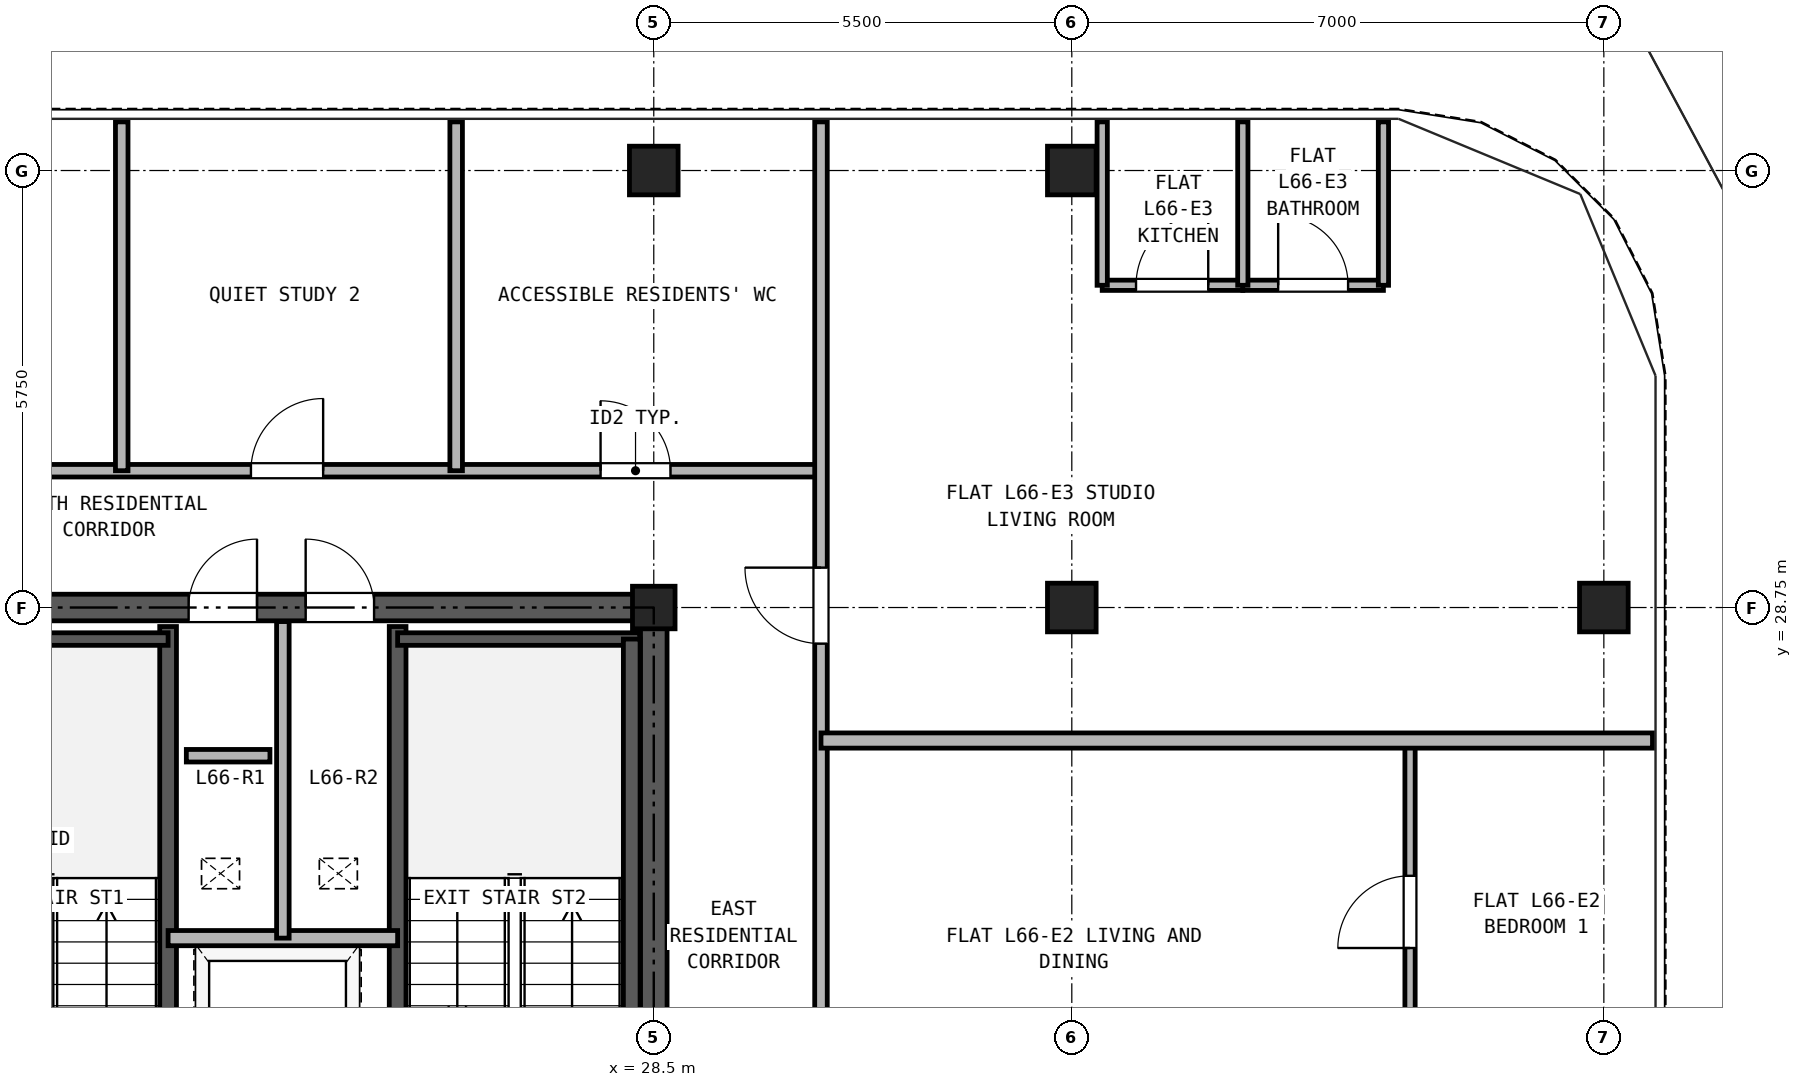
"""IFC4 building model, lengths in metres.
Left out: names, types, materials, properties, quantities, classifications, styles, units other than length and angle.
Written with IfcOpenShell. Run it as: python <this file> out.ifc"""

import sys

from ifc_helpers import new_model, si_unit, direction, frame, frame_2d, origin, origin_2d, place, context, subcontext, project, spatial, rectangle, hollow_rectangle, extrude, source, transform, mapped, element, fill, save


model = new_model("IFC4")
c1 = context("Model", 3, precision=1e-05, world=origin(), true_north=direction((0.0, 1.0)))
c2 = subcontext(c1, "Body", "Model", "MODEL_VIEW")
j1 = project(units=[si_unit("LENGTHUNIT", "METRE"), si_unit("PLANEANGLEUNIT", "RADIAN")], contexts=[c1])
p1 = place(None, origin())
s1 = spatial("IfcSite", under=j1, at=p1, CompositionType="ELEMENT")
p2 = place(p1, origin())
s2 = spatial("IfcBuilding", under=s1, at=p2, CompositionType="ELEMENT")
p3 = place(p2, frame((0.0, 0.0, 232.9)))
s3 = spatial("IfcBuildingStorey", under=s2, at=p3, CompositionType="ELEMENT", Elevation=232.9)
m1 = source(origin(), c2, "Body", "SweptSolid", [
    extrude(hollow_rectangle(XDim=0.64, YDim=0.64, WallThickness=0.035, at=origin_2d()), origin(), (0.0, 0.0, 1.0), 2.98),
])
for number, where, z_axis, x_axis in (
    (1, (28.5, 34.5, 0.0), (0.0, 0.0, 1.0), (1.0, 0.0, 0.0)),
    (2, (34.0, 34.5, 0.0), (0.0, 0.0, 1.0), (1.0, 0.0, 0.0)),
    (3, (41.0, 28.75, 0.0), (0.0, 0.0, 1.0), (1.0, 0.0, 0.0)),
):
    element("IfcColumn", number, at=place(p3, frame(where, z_axis=z_axis, x_axis=x_axis)), inside=s3, PredefinedType="COLUMN", context=c2, shape_type="MappedRepresentation", body=[
        mapped(m1, transform((0.0, 0.0, 0.0), x_axis=(1.0, 0.0, 0.0), y_axis=(0.0, 1.0, 0.0), z_axis=(0.0, 0.0, 1.0), scale=1.0)),
    ])
m2 = source(origin(), c2, "Body", "SweptSolid", [
    extrude(hollow_rectangle(XDim=0.56, YDim=0.56, WallThickness=0.03, at=origin_2d()), origin(), (0.0, 0.0, 1.0), 2.98),
])
p4 = place(p3, frame((28.5, 28.75, 0.0), z_axis=(0.0, 0.0, 1.0), x_axis=(1.0, 0.0, 0.0)))
e4 = element("IfcColumn", 4, at=p4, inside=s3, PredefinedType="COLUMN", context=c2, shape_type="MappedRepresentation", body=[
    mapped(m2, transform((0.0, 0.0, 0.0), x_axis=(1.0, 0.0, 0.0), y_axis=(0.0, 1.0, 0.0), z_axis=(0.0, 0.0, 1.0), scale=1.0)),
])
p5 = place(p3, frame((34.0, 28.75, 0.0), z_axis=(0.0, 0.0, 1.0), x_axis=(1.0, 0.0, 0.0)))
e5 = element("IfcColumn", 5, at=p5, inside=s3, PredefinedType="COLUMN", context=c2, shape_type="MappedRepresentation", body=[
    mapped(m1, transform((0.0, 0.0, 0.0), x_axis=(1.0, 0.0, 0.0), y_axis=(0.0, 1.0, 0.0), z_axis=(0.0, 0.0, 1.0), scale=1.0)),
])
p6 = place(p3, frame((18.325, 28.75, 0.0), z_axis=(0.0, 0.0, 1.0), x_axis=(1.0, 0.0, 0.0)))
e6 = element("IfcWall", 6, at=p6, inside=s3, PredefinedType="SHEAR", context=c2, shape_type="SweptSolid", body=[
    extrude(rectangle(XDim=10.35, YDim=0.35, at=frame_2d((5.175, 0.0))), origin(), (0.0, 0.0, 1.0), 2.98),
])
p7 = place(p6, frame((4.055, 0.0, 0.0)))
e7 = element("IfcOpeningElement", 7, at=p7, cuts=e6, PredefinedType="OPENING", context=c2, shape_type="SweptSolid", body=[
    extrude(rectangle(XDim=0.9, YDim=2.05, at=frame_2d((0.45, 1.025))), frame((0.0, 0.185, 0.0), z_axis=(0.0, -1.0, 0.0), x_axis=(1.0, 0.0, 0.0)), (0.0, 0.0, 1.0), 0.37),
])
p8 = place(p6, frame((5.595, 0.0, 0.0)))
e8 = element("IfcOpeningElement", 8, at=p8, cuts=e6, PredefinedType="OPENING", context=c2, shape_type="SweptSolid", body=[
    extrude(rectangle(XDim=0.9, YDim=2.05, at=frame_2d((0.45, 1.025))), frame((0.0, 0.185, 0.0), z_axis=(0.0, -1.0, 0.0), x_axis=(1.0, 0.0, 0.0)), (0.0, 0.0, 1.0), 0.37),
])
p9 = place(p3, frame((28.5, 11.675, 0.0), z_axis=(0.0, 0.0, 1.0), x_axis=(0.0, 1.0, 0.0)))
e9 = element("IfcWall", 9, at=p9, inside=s3, PredefinedType="SHEAR", context=c2, shape_type="SweptSolid", body=[
    extrude(rectangle(XDim=16.9, YDim=0.35, at=frame_2d((8.45, 0.0))), origin(), (0.0, 0.0, 1.0), 2.98),
])
p10 = place(p9, frame((7.475, 0.0, 0.0)))
e10 = element("IfcOpeningElement", 10, at=p10, cuts=e9, PredefinedType="OPENING", context=c2, shape_type="SweptSolid", body=[
    extrude(rectangle(XDim=1.15, YDim=2.2, at=frame_2d((0.575, 1.1))), frame((0.0, 0.185, 0.0), z_axis=(0.0, -1.0, 0.0), x_axis=(1.0, 0.0, 0.0)), (0.0, 0.0, 1.0), 0.37),
])
for number, where, z_axis, x_axis in (
    (11, (22.11, 21.39, 0.0), (0.0, 0.0, 1.0), (0.0, 1.0, 0.0)),
    (12, (25.13, 21.39, 0.0), (0.0, 0.0, 1.0), (0.0, 1.0, 0.0)),
):
    element("IfcWall", number, at=place(p3, frame(where, z_axis=z_axis, x_axis=x_axis)), inside=s3, PredefinedType="SOLIDWALL", context=c2, shape_type="SweptSolid", body=[
        extrude(rectangle(XDim=7.11, YDim=0.22, at=frame_2d((3.555, 0.0))), origin(), (0.0, 0.0, 1.0), 2.98),
    ])
p11 = place(p3, frame((18.685, 28.335, 0.0), z_axis=(0.0, 0.0, 1.0), x_axis=(1.0, 0.0, 0.0)))
e13 = element("IfcWall", 13, at=p11, inside=s3, PredefinedType="PARTITIONING", context=c2, shape_type="SweptSolid", body=[
    extrude(rectangle(XDim=3.425, YDim=0.165, at=frame_2d((1.712, 0.0))), origin(), (0.0, 0.0, 1.0), 2.98),
])
p12 = place(p3, frame((25.13, 28.335, 0.0), z_axis=(0.0, 0.0, 1.0), x_axis=(1.0, 0.0, 0.0)))
e14 = element("IfcWall", 14, at=p12, inside=s3, PredefinedType="PARTITIONING", context=c2, shape_type="SweptSolid", body=[
    extrude(rectangle(XDim=3.185, YDim=0.165, at=frame_2d((1.593, 0.0))), origin(), (0.0, 0.0, 1.0), 2.98),
])
p13 = place(p3, frame((28.21, 21.39, 0.0), z_axis=(0.0, 0.0, 1.0), x_axis=(0.0, 1.0, 0.0)))
e15 = element("IfcWall", 15, at=p13, inside=s3, PredefinedType="SOLIDWALL", context=c2, shape_type="SweptSolid", body=[
    extrude(rectangle(XDim=6.945, YDim=0.22, at=frame_2d((3.473, 0.0))), origin(), (0.0, 0.0, 1.0), 2.98),
])
p14 = place(p3, frame((22.11, 24.4, 0.0), z_axis=(0.0, 0.0, 1.0), x_axis=(1.0, 0.0, 0.0)))
e16 = element("IfcWall", 16, at=p14, inside=s3, PredefinedType="PARTITIONING", context=c2, shape_type="SweptSolid", body=[
    extrude(rectangle(XDim=3.02, YDim=0.2, at=frame_2d((1.51, 0.0))), origin(), (0.0, 0.0, 1.0), 2.98),
])
p15 = place(p3, frame((23.62, 24.4, 0.0), z_axis=(0.0, 0.0, 1.0), x_axis=(0.0, 1.0, 0.0)))
e17 = element("IfcWall", 17, at=p15, inside=s3, PredefinedType="PARTITIONING", context=c2, shape_type="SweptSolid", body=[
    extrude(rectangle(XDim=4.165, YDim=0.165, at=frame_2d((2.083, 0.0))), origin(), (0.0, 0.0, 1.0), 2.98),
])
p16 = place(p3, frame((16.3, 30.55, 0.0), z_axis=(0.0, 0.0, 1.0), x_axis=(1.0, 0.0, 0.0)))
e18 = element("IfcWall", 18, at=p16, inside=s3, PredefinedType="PARTITIONING", context=c2, shape_type="SweptSolid", body=[
    extrude(rectangle(XDim=14.4, YDim=0.165, at=frame_2d((7.2, 0.0))), origin(), (0.0, 0.0, 1.0), 2.98),
])
p17 = place(p16, frame((2.1, 0.0, 0.0)))
e19 = element("IfcOpeningElement", 19, at=p17, cuts=e18, PredefinedType="OPENING", context=c2, shape_type="SweptSolid", body=[
    extrude(rectangle(XDim=0.95, YDim=2.15, at=frame_2d((0.475, 1.075))), frame((0.0, 0.093, 0.0), z_axis=(0.0, -1.0, 0.0), x_axis=(1.0, 0.0, 0.0)), (0.0, 0.0, 1.0), 0.185),
])
p18 = place(p16, frame((6.9, 0.0, 0.0)))
e20 = element("IfcOpeningElement", 20, at=p18, cuts=e18, PredefinedType="OPENING", context=c2, shape_type="SweptSolid", body=[
    extrude(rectangle(XDim=0.95, YDim=2.15, at=frame_2d((0.475, 1.075))), frame((0.0, 0.093, 0.0), z_axis=(0.0, -1.0, 0.0), x_axis=(1.0, 0.0, 0.0)), (0.0, 0.0, 1.0), 0.185),
])
p19 = place(p16, frame((11.5, 0.0, 0.0)))
e21 = element("IfcOpeningElement", 21, at=p19, cuts=e18, PredefinedType="OPENING", context=c2, shape_type="SweptSolid", body=[
    extrude(rectangle(XDim=0.92, YDim=2.1, at=frame_2d((0.46, 1.05))), frame((0.0, 0.093, 0.0), z_axis=(0.0, -1.0, 0.0), x_axis=(1.0, 0.0, 0.0)), (0.0, 0.0, 1.0), 0.185),
])
p20 = place(p3, frame((30.7, 11.45, 0.0), z_axis=(0.0, 0.0, 1.0), x_axis=(0.0, 1.0, 0.0)))
e22 = element("IfcWall", 22, at=p20, inside=s3, PredefinedType="PARTITIONING", context=c2, shape_type="SweptSolid", body=[
    extrude(rectangle(XDim=23.69, YDim=0.165, at=frame_2d((11.845, 0.0))), origin(), (0.0, 0.0, 1.0), 2.98),
])
p21 = place(p20, frame((3.025, 0.0, 0.0)))
e23 = element("IfcOpeningElement", 23, at=p21, cuts=e22, PredefinedType="OPENING", context=c2, shape_type="SweptSolid", body=[
    extrude(rectangle(XDim=1.0, YDim=2.15, at=frame_2d((0.5, 1.075))), frame((0.0, 0.093, 0.0), z_axis=(0.0, -1.0, 0.0), x_axis=(1.0, 0.0, 0.0)), (0.0, 0.0, 1.0), 0.185),
])
p22 = place(p20, frame((10.8, 0.0, 0.0)))
e24 = element("IfcOpeningElement", 24, at=p22, cuts=e22, PredefinedType="OPENING", context=c2, shape_type="SweptSolid", body=[
    extrude(rectangle(XDim=1.0, YDim=2.15, at=frame_2d((0.5, 1.075))), frame((0.0, 0.093, 0.0), z_axis=(0.0, -1.0, 0.0), x_axis=(1.0, 0.0, 0.0)), (0.0, 0.0, 1.0), 0.185),
])
p23 = place(p20, frame((16.825, 0.0, 0.0)))
e25 = element("IfcOpeningElement", 25, at=p23, cuts=e22, PredefinedType="OPENING", context=c2, shape_type="SweptSolid", body=[
    extrude(rectangle(XDim=1.0, YDim=2.15, at=frame_2d((0.5, 1.075))), frame((0.0, 0.093, 0.0), z_axis=(0.0, -1.0, 0.0), x_axis=(1.0, 0.0, 0.0)), (0.0, 0.0, 1.0), 0.185),
])
p24 = place(p3, frame((38.45, 22.5, 0.0), z_axis=(0.0, 0.0, 1.0), x_axis=(0.0, 1.0, 0.0)))
e26 = element("IfcWall", 26, at=p24, inside=s3, PredefinedType="PARTITIONING", context=c2, shape_type="SweptSolid", body=[
    extrude(rectangle(XDim=4.5, YDim=0.135, at=frame_2d((2.25, 0.0))), origin(), (0.0, 0.0, 1.0), 2.98),
])
p25 = place(p24, frame((1.77, 0.0, 0.0)))
e27 = element("IfcOpeningElement", 27, at=p25, cuts=e26, PredefinedType="OPENING", context=c2, shape_type="SweptSolid", body=[
    extrude(rectangle(XDim=0.95, YDim=2.15, at=frame_2d((0.475, 1.075))), frame((0.0, 0.077, 0.0), z_axis=(0.0, -1.0, 0.0), x_axis=(1.0, 0.0, 0.0)), (0.0, 0.0, 1.0), 0.155),
])
p26 = place(p3, frame((30.7, 27.0, 0.0), z_axis=(0.0, 0.0, 1.0), x_axis=(1.0, 0.0, 0.0)))
e28 = element("IfcWall", 28, at=p26, inside=s3, PredefinedType="PARTITIONING", context=c2, shape_type="SweptSolid", body=[
    extrude(rectangle(XDim=10.94, YDim=0.2, at=frame_2d((5.47, 0.0))), origin(), (0.0, 0.0, 1.0), 2.98),
])
p27 = place(p3, frame((34.4, 32.99, 0.0), z_axis=(0.0, 0.0, 1.0), x_axis=(1.0, 0.0, 0.0)))
e29 = element("IfcWall", 29, at=p27, inside=s3, PredefinedType="PARTITIONING", context=c2, shape_type="SweptSolid", body=[
    extrude(rectangle(XDim=1.85, YDim=0.135, at=frame_2d((0.925, 0.0))), origin(), (0.0, 0.0, 1.0), 2.98),
])
p28 = place(p27, frame((0.445, 0.0, 0.0)))
e30 = element("IfcOpeningElement", 30, at=p28, cuts=e29, PredefinedType="OPENING", context=c2, shape_type="SweptSolid", body=[
    extrude(rectangle(XDim=0.95, YDim=2.15, at=frame_2d((0.475, 1.075))), frame((0.0, 0.077, 0.0), z_axis=(0.0, -1.0, 0.0), x_axis=(1.0, 0.0, 0.0)), (0.0, 0.0, 1.0), 0.155),
])
p29 = place(p3, frame((36.25, 32.99, 0.0), z_axis=(0.0, 0.0, 1.0), x_axis=(1.0, 0.0, 0.0)))
e31 = element("IfcWall", 31, at=p29, inside=s3, PredefinedType="PARTITIONING", context=c2, shape_type="SweptSolid", body=[
    extrude(rectangle(XDim=1.85, YDim=0.135, at=frame_2d((0.925, 0.0))), origin(), (0.0, 0.0, 1.0), 2.98),
])
p30 = place(p29, frame((0.465, 0.0, 0.0)))
e32 = element("IfcOpeningElement", 32, at=p30, cuts=e31, PredefinedType="OPENING", context=c2, shape_type="SweptSolid", body=[
    extrude(rectangle(XDim=0.92, YDim=2.1, at=frame_2d((0.46, 1.05))), frame((0.0, 0.077, 0.0), z_axis=(0.0, -1.0, 0.0), x_axis=(1.0, 0.0, 0.0)), (0.0, 0.0, 1.0), 0.155),
])
for number, where, z_axis, x_axis in (
    (33, (34.4, 32.99, 0.0), (0.0, 0.0, 1.0), (0.0, 1.0, 0.0)),
    (34, (36.25, 32.99, 0.0), (0.0, 0.0, 1.0), (0.0, 1.0, 0.0)),
    (35, (38.1, 32.99, 0.0), (0.0, 0.0, 1.0), (0.0, 1.0, 0.0)),
):
    element("IfcWall", number, at=place(p3, frame(where, z_axis=z_axis, x_axis=x_axis)), inside=s3, PredefinedType="PARTITIONING", context=c2, shape_type="SweptSolid", body=[
        extrude(rectangle(XDim=2.15, YDim=0.135, at=frame_2d((1.075, 0.0))), origin(), (0.0, 0.0, 1.0), 2.98),
    ])
for number, where, z_axis, x_axis in (
    (36, (21.5, 30.55, 0.0), (0.0, 0.0, 1.0), (0.0, 1.0, 0.0)),
    (37, (25.9, 30.55, 0.0), (0.0, 0.0, 1.0), (0.0, 1.0, 0.0)),
):
    element("IfcWall", number, at=place(p3, frame(where, z_axis=z_axis, x_axis=x_axis)), inside=s3, PredefinedType="PARTITIONING", context=c2, shape_type="SweptSolid", body=[
        extrude(rectangle(XDim=4.59, YDim=0.165, at=frame_2d((2.295, 0.0))), origin(), (0.0, 0.0, 1.0), 2.98),
    ])
p31 = place(p3, frame((22.35, 26.8, 0.0), z_axis=(0.0, 0.0, 1.0), x_axis=(1.0, 0.0, 0.0)))
e38 = element("IfcWall", 38, at=p31, inside=s3, PredefinedType="PARTITIONING", context=c2, shape_type="SweptSolid", body=[
    extrude(rectangle(XDim=1.1, YDim=0.165, at=frame_2d((0.55, 0.0))), origin(), (0.0, 0.0, 1.0), 2.98),
])
p32 = place(p7, origin())
e39 = element("IfcDoor", 39, at=p32, inside=s3, OperationType="SINGLE_SWING_RIGHT", PredefinedType="DOOR", context=c2, shape_type="SweptSolid", body=[
    extrude(rectangle(XDim=0.9, YDim=2.05, at=frame_2d((0.45, 1.025))), frame((0.0, 0.025, 0.0), z_axis=(0.0, -1.0, 0.0), x_axis=(1.0, 0.0, 0.0)), (0.0, 0.0, 1.0), 0.05),
])
fill(e7, e39)
p33 = place(p8, origin())
e40 = element("IfcDoor", 40, at=p33, inside=s3, OperationType="SINGLE_SWING_LEFT", PredefinedType="DOOR", context=c2, shape_type="SweptSolid", body=[
    extrude(rectangle(XDim=0.9, YDim=2.05, at=frame_2d((0.45, 1.025))), frame((0.0, 0.025, 0.0), z_axis=(0.0, -1.0, 0.0), x_axis=(1.0, 0.0, 0.0)), (0.0, 0.0, 1.0), 0.05),
])
fill(e8, e40)
p34 = place(p25, frame((0.95, 0.0, 0.0), z_axis=(0.0, 0.0, 1.0), x_axis=(-1.0, 0.0, 0.0)))
e41 = element("IfcDoor", 41, at=p34, inside=s3, OperationType="SINGLE_SWING_LEFT", PredefinedType="DOOR", context=c2, shape_type="SweptSolid", body=[
    extrude(rectangle(XDim=0.95, YDim=2.15, at=frame_2d((0.475, 1.075))), frame((0.0, 0.025, 0.0), z_axis=(0.0, -1.0, 0.0), x_axis=(1.0, 0.0, 0.0)), (0.0, 0.0, 1.0), 0.05),
])
fill(e27, e41)
p35 = place(p28, frame((0.95, 0.0, 0.0), z_axis=(0.0, 0.0, 1.0), x_axis=(-1.0, 0.0, 0.0)))
e42 = element("IfcDoor", 42, at=p35, inside=s3, OperationType="SINGLE_SWING_RIGHT", PredefinedType="DOOR", context=c2, shape_type="SweptSolid", body=[
    extrude(rectangle(XDim=0.95, YDim=2.15, at=frame_2d((0.475, 1.075))), frame((0.0, 0.025, 0.0), z_axis=(0.0, -1.0, 0.0), x_axis=(1.0, 0.0, 0.0)), (0.0, 0.0, 1.0), 0.05),
])
fill(e30, e42)
p36 = place(p30, frame((0.92, 0.0, 0.0), z_axis=(0.0, 0.0, 1.0), x_axis=(-1.0, 0.0, 0.0)))
e43 = element("IfcDoor", 43, at=p36, inside=s3, OperationType="SINGLE_SWING_LEFT", PredefinedType="DOOR", context=c2, shape_type="SweptSolid", body=[
    extrude(rectangle(XDim=0.92, YDim=2.1, at=frame_2d((0.46, 1.05))), frame((0.0, 0.025, 0.0), z_axis=(0.0, -1.0, 0.0), x_axis=(1.0, 0.0, 0.0)), (0.0, 0.0, 1.0), 0.05),
])
fill(e32, e43)
p37 = place(p23, frame((1.0, 0.0, 0.0), z_axis=(0.0, 0.0, 1.0), x_axis=(-1.0, 0.0, 0.0)))
e44 = element("IfcDoor", 44, at=p37, inside=s3, OperationType="SINGLE_SWING_RIGHT", PredefinedType="DOOR", context=c2, shape_type="SweptSolid", body=[
    extrude(rectangle(XDim=1.0, YDim=2.15, at=frame_2d((0.5, 1.075))), frame((0.0, 0.025, 0.0), z_axis=(0.0, -1.0, 0.0), x_axis=(1.0, 0.0, 0.0)), (0.0, 0.0, 1.0), 0.05),
])
fill(e25, e44)
p38 = place(p18, origin())
e45 = element("IfcDoor", 45, at=p38, inside=s3, OperationType="SINGLE_SWING_RIGHT", PredefinedType="DOOR", context=c2, shape_type="SweptSolid", body=[
    extrude(rectangle(XDim=0.95, YDim=2.15, at=frame_2d((0.475, 1.075))), frame((0.0, 0.025, 0.0), z_axis=(0.0, -1.0, 0.0), x_axis=(1.0, 0.0, 0.0)), (0.0, 0.0, 1.0), 0.05),
])
fill(e20, e45)
p39 = place(p19, origin())
e46 = element("IfcDoor", 46, at=p39, inside=s3, OperationType="SINGLE_SWING_LEFT", PredefinedType="DOOR", context=c2, shape_type="SweptSolid", body=[
    extrude(rectangle(XDim=0.92, YDim=2.1, at=frame_2d((0.46, 1.05))), frame((0.0, 0.025, 0.0), z_axis=(0.0, -1.0, 0.0), x_axis=(1.0, 0.0, 0.0)), (0.0, 0.0, 1.0), 0.05),
])
fill(e21, e46)
save(model, sys.argv[1])
